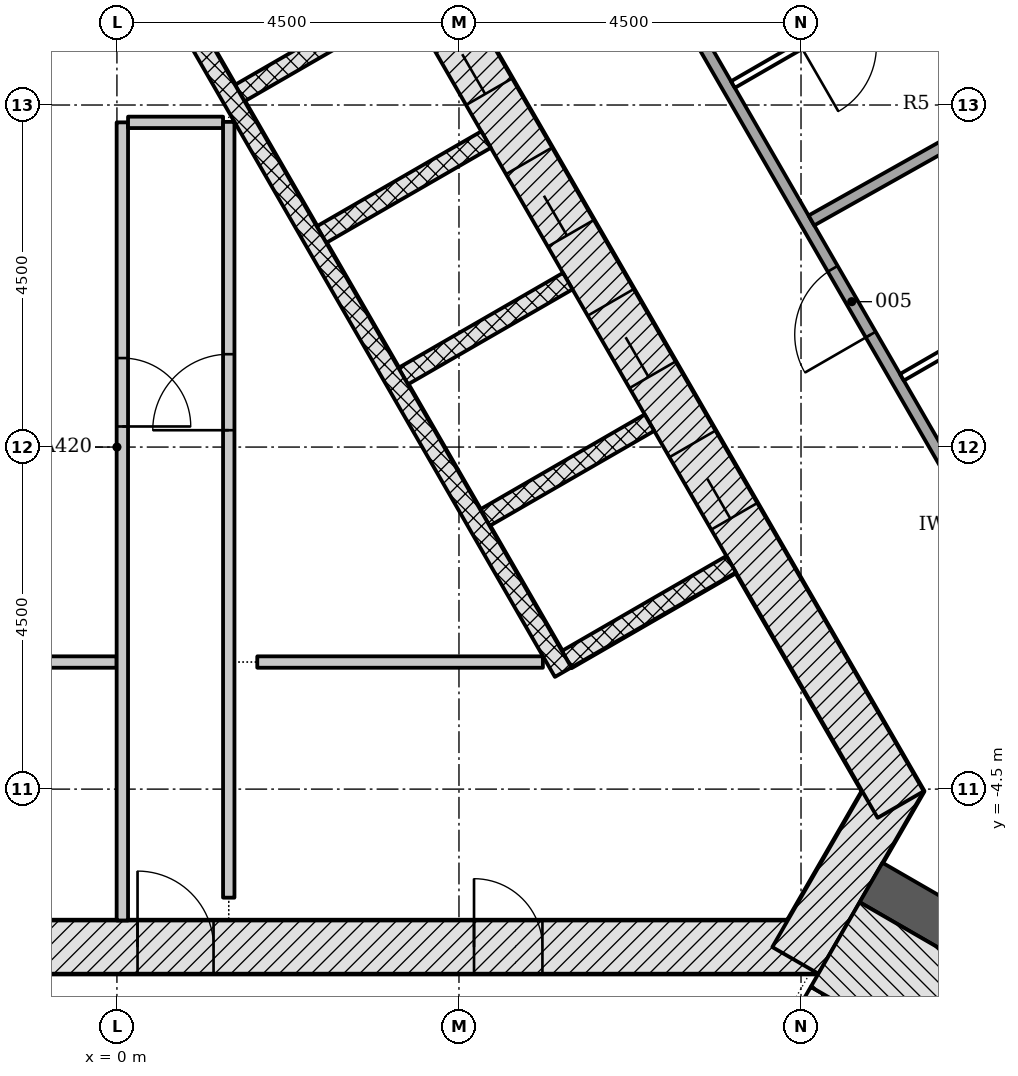
"""IFC4 building model, lengths in metres.
Left out: names, types, materials, properties, quantities, classifications, styles, units other than length and angle.
Written with IfcOpenShell. Run it as: python <this file> out.ifc"""

import sys

from ifc_helpers import new_model, si_unit, direction, frame, frame_2d, origin, place, context, subcontext, project, spatial, rectangle, extrude, element, fill, save


model = new_model("IFC4")
c1 = context("Model", 3, precision=1e-05, world=origin(), true_north=direction((0.0, 1.0)))
c2 = subcontext(c1, "Body", "Model", "MODEL_VIEW")
j1 = project(units=[si_unit("LENGTHUNIT", "METRE"), si_unit("PLANEANGLEUNIT", "RADIAN")], contexts=[c1])
p1 = place(None, origin())
s1 = spatial("IfcSite", under=j1, at=p1, CompositionType="ELEMENT")
p2 = place(p1, origin())
s2 = spatial("IfcBuilding", under=s1, at=p2, CompositionType="ELEMENT")
p3 = place(p2, frame((0.0, 0.0, 240.0)))
s3 = spatial("IfcBuildingStorey", under=s2, at=p3, CompositionType="ELEMENT", Elevation=240.0)
p4 = place(p3, frame((-9.229, -6.578, -0.2), z_axis=(0.0, 0.0, 1.0), x_axis=(1.0, 0.0, 0.0)))
e1 = element("IfcWall", 1, at=p4, inside=s3, PredefinedType="SHEAR", context=c2, shape_type="SweptSolid", body=[
    extrude(rectangle(XDim=18.458, YDim=0.7, at=frame_2d((9.229, 0.0))), origin(), (0.0, 0.0, 1.0), 3.6),
])
p5 = place(p4, frame((9.5, 0.0, 0.2)))
e2 = element("IfcOpeningElement", 2, at=p5, cuts=e1, PredefinedType="OPENING", context=c2, shape_type="SweptSolid", body=[
    extrude(rectangle(XDim=1.0, YDim=2.1, at=frame_2d((0.5, 1.05))), frame((0.0, 0.36, 0.0), z_axis=(0.0, -1.0, 0.0), x_axis=(1.0, 0.0, 0.0)), (0.0, 0.0, 1.0), 0.72),
])
p6 = place(p4, frame((4.402, 0.0, 0.2)))
e3 = element("IfcOpeningElement", 3, at=p6, cuts=e1, PredefinedType="OPENING", context=c2, shape_type="SweptSolid", body=[
    extrude(rectangle(XDim=0.9, YDim=2.1, at=frame_2d((0.45, 1.05))), frame((0.0, 0.36, 0.0), z_axis=(0.0, -1.0, 0.0), x_axis=(1.0, 0.0, 0.0)), (0.0, 0.0, 1.0), 0.72),
])
p7 = place(p4, frame((13.927, 0.0, 0.2)))
e4 = element("IfcOpeningElement", 4, at=p7, cuts=e1, PredefinedType="OPENING", context=c2, shape_type="SweptSolid", body=[
    extrude(rectangle(XDim=0.9, YDim=2.1, at=frame_2d((0.45, 1.05))), frame((0.0, 0.36, 0.0), z_axis=(0.0, -1.0, 0.0), x_axis=(1.0, 0.0, 0.0)), (0.0, 0.0, 1.0), 0.72),
])
p8 = place(p3, frame((8.926, -6.753, -0.2), z_axis=(0.0, 0.0, 1.0), x_axis=(0.500042739161, 0.866000726912, 0.0)))
e5 = element("IfcWall", 5, at=p8, inside=s3, PredefinedType="SHEAR", context=c2, shape_type="SweptSolid", body=[
    extrude(rectangle(XDim=2.771, YDim=0.7, at=frame_2d((1.386, 0.0))), origin(), (0.0, 0.0, 1.0), 3.6),
])
p9 = place(p3, frame((10.311, -4.703, -0.2), z_axis=(0.0, 0.0, 1.0), x_axis=(-0.500001446645, 0.866024568562, 0.0)))
e6 = element("IfcWall", 6, at=p9, inside=s3, PredefinedType="SHEAR", context=c2, shape_type="SweptSolid", body=[
    extrude(rectangle(XDim=18.458, YDim=0.7, at=frame_2d((9.229, 0.0))), origin(), (0.0, 0.0, 1.0), 3.6),
])
p10 = place(p9, frame((4.379, 0.0, 0.2)))
e7 = element("IfcOpeningElement", 7, at=p10, cuts=e6, PredefinedType="OPENING", context=c2, shape_type="SweptSolid", body=[
    extrude(rectangle(XDim=1.1, YDim=2.1, at=frame_2d((0.55, 1.05))), frame((0.0, 0.36, 0.0), z_axis=(0.0, -1.0, 0.0), x_axis=(1.0, 0.0, 0.0)), (0.0, 0.0, 1.0), 0.72),
])
p11 = place(p9, frame((6.529, 0.0, 0.2)))
e8 = element("IfcOpeningElement", 8, at=p11, cuts=e6, PredefinedType="OPENING", context=c2, shape_type="SweptSolid", body=[
    extrude(rectangle(XDim=1.1, YDim=2.1, at=frame_2d((0.55, 1.05))), frame((0.0, 0.36, 0.0), z_axis=(0.0, -1.0, 0.0), x_axis=(1.0, 0.0, 0.0)), (0.0, 0.0, 1.0), 0.72),
])
p12 = place(p9, frame((8.679, 0.0, 0.2)))
e9 = element("IfcOpeningElement", 9, at=p12, cuts=e6, PredefinedType="OPENING", context=c2, shape_type="SweptSolid", body=[
    extrude(rectangle(XDim=1.1, YDim=2.1, at=frame_2d((0.55, 1.05))), frame((0.0, 0.36, 0.0), z_axis=(0.0, -1.0, 0.0), x_axis=(1.0, 0.0, 0.0)), (0.0, 0.0, 1.0), 0.72),
])
p13 = place(p9, frame((10.829, 0.0, 0.2)))
e10 = element("IfcOpeningElement", 10, at=p13, cuts=e6, PredefinedType="OPENING", context=c2, shape_type="SweptSolid", body=[
    extrude(rectangle(XDim=1.1, YDim=2.1, at=frame_2d((0.55, 1.05))), frame((0.0, 0.36, 0.0), z_axis=(0.0, -1.0, 0.0), x_axis=(1.0, 0.0, 0.0)), (0.0, 0.0, 1.0), 0.72),
])
p14 = place(p9, frame((12.979, 0.0, 0.2)))
e11 = element("IfcOpeningElement", 11, at=p14, cuts=e6, PredefinedType="OPENING", context=c2, shape_type="SweptSolid", body=[
    extrude(rectangle(XDim=1.1, YDim=2.1, at=frame_2d((0.55, 1.05))), frame((0.0, 0.36, 0.0), z_axis=(0.0, -1.0, 0.0), x_axis=(1.0, 0.0, 0.0)), (0.0, 0.0, 1.0), 0.72),
])
p15 = place(p3, frame((-1.083, 11.281, -0.2), z_axis=(0.0, 0.0, 1.0), x_axis=(-0.500001446645, -0.866024568562, 0.0)))
e12 = element("IfcWall", 12, at=p15, inside=s3, PredefinedType="SHEAR", context=c2, shape_type="SweptSolid", body=[
    extrude(rectangle(XDim=18.458, YDim=0.7, at=frame_2d((9.229, 0.0))), origin(), (0.0, 0.0, 1.0), 3.6),
])
p16 = place(p15, frame((8.979, 0.0, 0.2)))
e13 = element("IfcOpeningElement", 13, at=p16, cuts=e12, PredefinedType="OPENING", context=c2, shape_type="SweptSolid", body=[
    extrude(rectangle(XDim=1.2, YDim=2.1, at=frame_2d((0.6, 1.05))), frame((0.0, 0.36, 0.0), z_axis=(0.0, -1.0, 0.0), x_axis=(1.0, 0.0, 0.0)), (0.0, 0.0, 1.0), 0.72),
])
p17 = place(p15, frame((11.029, 0.0, 0.2)))
e14 = element("IfcOpeningElement", 14, at=p17, cuts=e12, PredefinedType="OPENING", context=c2, shape_type="SweptSolid", body=[
    extrude(rectangle(XDim=1.2, YDim=2.1, at=frame_2d((0.6, 1.05))), frame((0.0, 0.36, 0.0), z_axis=(0.0, -1.0, 0.0), x_axis=(1.0, 0.0, 0.0)), (0.0, 0.0, 1.0), 0.72),
])
p18 = place(p3, frame((9.922, -5.728, -0.2), z_axis=(0.0, 0.0, 1.0), x_axis=(0.866029688112, -0.499992579254, 0.0)))
e15 = element("IfcWall", 15, at=p18, inside=s3, PredefinedType="SHEAR", context=c2, shape_type="SweptSolid", body=[
    extrude(rectangle(XDim=7.093, YDim=0.6, at=frame_2d((3.547, 0.0))), origin(), (0.0, 0.0, 1.0), 3.6),
])
for number, where, z_axis, x_axis in (
    (16, (8.081, -1.541, -0.2), (0.0, 0.0, 1.0), (-0.866, -0.5, 0.0)),
    (17, (7.006, 0.321, -0.2), (0.0, 0.0, 1.0), (-0.866, -0.5, 0.0)),
):
    element("IfcWall", number, at=place(p3, frame(where, z_axis=z_axis, x_axis=x_axis)), inside=s3, PredefinedType="PARTITIONING", context=c2, shape_type="SweptSolid", body=[
        extrude(rectangle(XDim=2.5, YDim=0.25, at=frame_2d((1.25, 0.0))), origin(), (0.0, 0.0, 1.0), 3.6),
    ])
p19 = place(p3, frame((5.931, 2.183, -0.2), z_axis=(0.0, 0.0, 1.0), x_axis=(-0.866047370643, -0.499961950354, 0.0)))
e18 = element("IfcWall", 18, at=p19, inside=s3, PredefinedType="PARTITIONING", context=c2, shape_type="SweptSolid", body=[
    extrude(rectangle(XDim=2.5, YDim=0.25, at=frame_2d((1.25, 0.0))), origin(), (0.0, 0.0, 1.0), 3.6),
])
for number, where, z_axis, x_axis in (
    (19, (4.856, 4.045, -0.2), (0.0, 0.0, 1.0), (-0.866, -0.5, 0.0)),
    (20, (3.781, 5.907, -0.2), (0.0, 0.0, 1.0), (-0.866, -0.5, 0.0)),
):
    element("IfcWall", number, at=place(p3, frame(where, z_axis=z_axis, x_axis=x_axis)), inside=s3, PredefinedType="PARTITIONING", context=c2, shape_type="SweptSolid", body=[
        extrude(rectangle(XDim=2.5, YDim=0.25, at=frame_2d((1.25, 0.0))), origin(), (0.0, 0.0, 1.0), 3.6),
    ])
p20 = place(p3, frame((5.87, -2.961, 0.0), z_axis=(0.0, 0.0, 1.0), x_axis=(-0.50000615651, 0.866021849293, 0.0)))
e21 = element("IfcWall", 21, at=p20, inside=s3, PredefinedType="PARTITIONING", context=c2, shape_type="SweptSolid", body=[
    extrude(rectangle(XDim=11.0, YDim=0.25, at=frame_2d((5.5, 0.0))), origin(), (0.0, 0.0, 1.0), 3.4),
])
p21 = place(p3, frame((-5.142, -2.828, 0.0), z_axis=(0.0, 0.0, 1.0), x_axis=(1.0, 0.0, 0.0)))
e22 = element("IfcWall", 22, at=p21, inside=s3, PredefinedType="PARTITIONING", context=c2, shape_type="SweptSolid", body=[
    extrude(rectangle(XDim=5.139, YDim=0.15, at=frame_2d((2.569, 0.0))), origin(), (0.0, 0.0, 1.0), 3.4),
])
p22 = place(p3, frame((0.071, 4.272, 0.0), z_axis=(0.0, 0.0, 1.0), x_axis=(0.0, -1.0, 0.0)))
e23 = element("IfcWall", 23, at=p22, inside=s3, PredefinedType="PARTITIONING", context=c2, shape_type="SweptSolid", body=[
    extrude(rectangle(XDim=10.5, YDim=0.15, at=frame_2d((5.25, 0.0))), origin(), (0.0, 0.0, 1.0), 3.4),
])
p23 = place(p22, frame((3.101, 0.0, 0.0)))
e24 = element("IfcOpeningElement", 24, at=p23, cuts=e23, PredefinedType="OPENING", context=c2, shape_type="SweptSolid", body=[
    extrude(rectangle(XDim=0.9, YDim=2.1, at=frame_2d((0.45, 1.05))), frame((0.0, 0.085, 0.0), z_axis=(0.0, -1.0, 0.0), x_axis=(1.0, 0.0, 0.0)), (0.0, 0.0, 1.0), 0.17),
])
p24 = place(p3, frame((0.146, 4.272, 0.0), z_axis=(0.0, 0.0, 1.0), x_axis=(1.0, 0.0, 0.0)))
e25 = element("IfcWall", 25, at=p24, inside=s3, PredefinedType="PARTITIONING", context=c2, shape_type="SweptSolid", body=[
    extrude(rectangle(XDim=1.25, YDim=0.15, at=frame_2d((0.625, 0.0))), origin(), (0.0, 0.0, 1.0), 3.4),
])
p25 = place(p3, frame((1.471, -5.928, 0.0), z_axis=(0.0, 0.0, 1.0), x_axis=(0.0, 1.0, 0.0)))
e26 = element("IfcWall", 26, at=p25, inside=s3, PredefinedType="PARTITIONING", context=c2, shape_type="SweptSolid", body=[
    extrude(rectangle(XDim=10.206, YDim=0.15, at=frame_2d((5.103, 0.0))), origin(), (0.0, 0.0, 1.0), 3.4),
])
p26 = place(p25, frame((6.15, 0.0, 0.0)))
e27 = element("IfcOpeningElement", 27, at=p26, cuts=e26, PredefinedType="OPENING", context=c2, shape_type="SweptSolid", body=[
    extrude(rectangle(XDim=1.0, YDim=2.1, at=frame_2d((0.5, 1.05))), frame((0.0, 0.085, 0.0), z_axis=(0.0, -1.0, 0.0), x_axis=(1.0, 0.0, 0.0)), (0.0, 0.0, 1.0), 0.17),
])
p27 = place(p3, frame((1.846, -2.828, 0.0), z_axis=(0.0, 0.0, 1.0), x_axis=(1.0, 0.0, 0.0)))
e28 = element("IfcWall", 28, at=p27, inside=s3, PredefinedType="PARTITIONING", context=c2, shape_type="SweptSolid", body=[
    extrude(rectangle(XDim=3.758, YDim=0.15, at=frame_2d((1.879, 0.0))), origin(), (0.0, 0.0, 1.0), 3.4),
])
p28 = place(p3, frame((7.44, -10.226, -0.2), z_axis=(0.0, 0.0, 1.0), x_axis=(0.500022077904, 0.866012656725, 0.0)))
e29 = element("IfcWall", 29, at=p28, inside=s3, PredefinedType="SHEAR", context=c2, shape_type="SweptSolid", body=[
    extrude(rectangle(XDim=3.55, YDim=0.2, at=frame_2d((1.775, 0.0))), origin(), (0.0, 0.0, 1.0), 3.6),
])
p29 = place(p28, frame((1.175, 0.0, 0.2)))
e30 = element("IfcOpeningElement", 30, at=p29, cuts=e29, PredefinedType="OPENING", context=c2, shape_type="SweptSolid", body=[
    extrude(rectangle(XDim=1.2, YDim=2.1, at=frame_2d((0.6, 1.05))), frame((0.0, 0.11, 0.0), z_axis=(0.0, -1.0, 0.0), x_axis=(1.0, 0.0, 0.0)), (0.0, 0.0, 1.0), 0.22),
])
p30 = place(p3, frame((9.45, -6.545, -0.2), z_axis=(0.0, 0.0, 1.0), x_axis=(0.866023389271, -0.500003489223, 0.0)))
e31 = element("IfcWall", 31, at=p30, inside=s3, PredefinedType="SHEAR", context=c2, shape_type="SweptSolid", body=[
    extrude(rectangle(XDim=7.094, YDim=1.286, at=frame_2d((3.547, 0.0))), origin(), (0.0, 0.0, 1.0), 3.6),
])
p31 = place(p3, frame((15.836, -8.772, 0.0), z_axis=(0.0, 0.0, 1.0), x_axis=(-0.500001479768, 0.866024549438, 0.0)))
e32 = element("IfcWall", 32, at=p31, inside=s3, PredefinedType="PARTITIONING", context=c2, shape_type="SweptSolid", body=[
    extrude(rectangle(XDim=17.9, YDim=0.15, at=frame_2d((8.95, 0.0))), origin(), (0.0, 0.0, 1.0), 2.852),
])
p32 = place(p31, frame((2.973, 0.0, 0.0)))
e33 = element("IfcOpeningElement", 33, at=p32, cuts=e32, PredefinedType="OPENING", context=c2, shape_type="SweptSolid", body=[
    extrude(rectangle(XDim=1.0, YDim=2.1, at=frame_2d((0.5, 1.05))), frame((0.0, 0.085, 0.0), z_axis=(0.0, -1.0, 0.0), x_axis=(1.0, 0.0, 0.0)), (0.0, 0.0, 1.0), 0.17),
])
p33 = place(p31, frame((11.837, 0.0, 0.0)))
e34 = element("IfcOpeningElement", 34, at=p33, cuts=e32, PredefinedType="OPENING", context=c2, shape_type="SweptSolid", body=[
    extrude(rectangle(XDim=1.0, YDim=2.1, at=frame_2d((0.5, 1.05))), frame((0.0, 0.085, 0.0), z_axis=(0.0, -1.0, 0.0), x_axis=(1.0, 0.0, 0.0)), (0.0, 0.0, 1.0), 0.17),
])
p34 = place(p3, frame((12.991, 2.456, 0.0), z_axis=(0.0, 0.0, 1.0), x_axis=(-0.866030883713, -0.499990508365, 0.0)))
e35 = element("IfcWall", 35, at=p34, inside=s3, PredefinedType="PARTITIONING", context=c2, shape_type="SweptSolid", body=[
    extrude(rectangle(XDim=3.075, YDim=0.1, at=frame_2d((1.537, 0.0))), origin(), (0.0, 0.0, 1.0), 3.4),
])
p35 = place(p34, frame((1.05, 0.0, 0.0)))
e36 = element("IfcOpeningElement", 36, at=p35, cuts=e35, PredefinedType="OPENING", context=c2, shape_type="SweptSolid", body=[
    extrude(rectangle(XDim=1.0, YDim=2.1, at=frame_2d((0.5, 1.05))), frame((0.0, 0.06, 0.0), z_axis=(0.0, -1.0, 0.0), x_axis=(1.0, 0.0, 0.0)), (0.0, 0.0, 1.0), 0.12),
])
p36 = place(p3, frame((13.362, 5.357, 0.0), z_axis=(0.0, 0.0, 1.0), x_axis=(-0.871708672205, -0.490024479799, 0.0)))
e37 = element("IfcWall", 37, at=p36, inside=s3, PredefinedType="PARTITIONING", context=c2, shape_type="SweptSolid", body=[
    extrude(rectangle(XDim=4.847, YDim=0.15, at=frame_2d((2.424, 0.0))), origin(), (0.0, 0.0, 1.0), 3.4),
])
p37 = place(p3, frame((11.823, 4.578, 0.0), z_axis=(0.0, 0.0, 1.0), x_axis=(-0.499990325971, 0.866030989016, 0.0)))
e38 = element("IfcWall", 38, at=p37, inside=s3, PredefinedType="PARTITIONING", context=c2, shape_type="SweptSolid", body=[
    extrude(rectangle(XDim=2.025, YDim=0.1, at=frame_2d((1.012, 0.0))), origin(), (0.0, 0.0, 1.0), 3.4),
])
p38 = place(p3, frame((10.768, 6.306, 0.0), z_axis=(0.0, 0.0, 1.0), x_axis=(-0.866050731258, -0.499956128963, 0.0)))
e39 = element("IfcWall", 39, at=p38, inside=s3, PredefinedType="PARTITIONING", context=c2, shape_type="SweptSolid", body=[
    extrude(rectangle(XDim=3.075, YDim=0.1, at=frame_2d((1.538, 0.0))), origin(), (0.0, 0.0, 1.0), 3.4),
])
p39 = place(p38, frame((1.05, 0.0, 0.0)))
e40 = element("IfcOpeningElement", 40, at=p39, cuts=e39, PredefinedType="OPENING", context=c2, shape_type="SweptSolid", body=[
    extrude(rectangle(XDim=1.0, YDim=2.1, at=frame_2d((0.5, 1.05))), frame((0.0, 0.06, 0.0), z_axis=(0.0, -1.0, 0.0), x_axis=(1.0, 0.0, 0.0)), (0.0, 0.0, 1.0), 0.12),
])
p40 = place(p3, frame((-0.783, 18.1, 0.0), z_axis=(0.0, 0.0, 1.0), x_axis=(-0.499991500055, -0.866030311174, 0.0)))
e41 = element("IfcWall", 41, at=p40, inside=s3, PredefinedType="PARTITIONING", context=c2, shape_type="SweptSolid", body=[
    extrude(rectangle(XDim=17.674, YDim=0.15, at=frame_2d((8.837, 0.0))), origin(), (0.0, 0.0, 1.0), 2.852),
])
p41 = place(p10, origin())
e42 = element("IfcDoor", 42, at=p41, inside=s3, OperationType="DOUBLE_DOOR_SLIDING", PredefinedType="DOOR", context=c2, shape_type="SweptSolid", body=[
    extrude(rectangle(XDim=1.1, YDim=2.1, at=frame_2d((0.55, 1.05))), frame((0.0, 0.025, 0.0), z_axis=(0.0, -1.0, 0.0), x_axis=(1.0, 0.0, 0.0)), (0.0, 0.0, 1.0), 0.05),
])
fill(e7, e42)
p42 = place(p11, origin())
e43 = element("IfcDoor", 43, at=p42, inside=s3, OperationType="DOUBLE_DOOR_SLIDING", PredefinedType="DOOR", context=c2, shape_type="SweptSolid", body=[
    extrude(rectangle(XDim=1.1, YDim=2.1, at=frame_2d((0.55, 1.05))), frame((0.0, 0.025, 0.0), z_axis=(0.0, -1.0, 0.0), x_axis=(1.0, 0.0, 0.0)), (0.0, 0.0, 1.0), 0.05),
])
fill(e8, e43)
p43 = place(p12, origin())
e44 = element("IfcDoor", 44, at=p43, inside=s3, OperationType="DOUBLE_DOOR_SLIDING", PredefinedType="DOOR", context=c2, shape_type="SweptSolid", body=[
    extrude(rectangle(XDim=1.1, YDim=2.1, at=frame_2d((0.55, 1.05))), frame((0.0, 0.025, 0.0), z_axis=(0.0, -1.0, 0.0), x_axis=(1.0, 0.0, 0.0)), (0.0, 0.0, 1.0), 0.05),
])
fill(e9, e44)
p44 = place(p13, origin())
e45 = element("IfcDoor", 45, at=p44, inside=s3, OperationType="DOUBLE_DOOR_SLIDING", PredefinedType="DOOR", context=c2, shape_type="SweptSolid", body=[
    extrude(rectangle(XDim=1.1, YDim=2.1, at=frame_2d((0.55, 1.05))), frame((0.0, 0.025, 0.0), z_axis=(0.0, -1.0, 0.0), x_axis=(1.0, 0.0, 0.0)), (0.0, 0.0, 1.0), 0.05),
])
fill(e10, e45)
p45 = place(p5, origin())
e46 = element("IfcDoor", 46, at=p45, inside=s3, OperationType="SINGLE_SWING_LEFT", PredefinedType="DOOR", context=c2, shape_type="SweptSolid", body=[
    extrude(rectangle(XDim=1.0, YDim=2.1, at=frame_2d((0.5, 1.05))), frame((0.0, 0.075, 0.0), z_axis=(0.0, -1.0, 0.0), x_axis=(1.0, 0.0, 0.0)), (0.0, 0.0, 1.0), 0.15),
])
fill(e2, e46)
p46 = place(p7, origin())
e47 = element("IfcDoor", 47, at=p46, inside=s3, OperationType="SINGLE_SWING_LEFT", PredefinedType="DOOR", context=c2, shape_type="SweptSolid", body=[
    extrude(rectangle(XDim=0.9, YDim=2.1, at=frame_2d((0.45, 1.05))), frame((0.0, 0.075, 0.0), z_axis=(0.0, -1.0, 0.0), x_axis=(1.0, 0.0, 0.0)), (0.0, 0.0, 1.0), 0.15),
])
fill(e4, e47)
p47 = place(p23, origin())
e48 = element("IfcDoor", 48, at=p47, inside=s3, OperationType="SINGLE_SWING_RIGHT", PredefinedType="DOOR", context=c2, shape_type="SweptSolid", body=[
    extrude(rectangle(XDim=0.9, YDim=2.1, at=frame_2d((0.45, 1.05))), frame((0.0, 0.025, 0.0), z_axis=(0.0, -1.0, 0.0), x_axis=(1.0, 0.0, 0.0)), (0.0, 0.0, 1.0), 0.05),
])
fill(e24, e48)
p48 = place(p26, origin())
e49 = element("IfcDoor", 49, at=p48, inside=s3, OperationType="SINGLE_SWING_LEFT", PredefinedType="DOOR", context=c2, shape_type="SweptSolid", body=[
    extrude(rectangle(XDim=1.0, YDim=2.1, at=frame_2d((0.5, 1.05))), frame((0.0, 0.025, 0.0), z_axis=(0.0, -1.0, 0.0), x_axis=(1.0, 0.0, 0.0)), (0.0, 0.0, 1.0), 0.05),
])
fill(e27, e49)
p49 = place(p33, origin())
e50 = element("IfcDoor", 50, at=p49, inside=s3, OperationType="SINGLE_SWING_LEFT", PredefinedType="DOOR", context=c2, shape_type="SweptSolid", body=[
    extrude(rectangle(XDim=1.0, YDim=2.1, at=frame_2d((0.5, 1.05))), frame((0.0, 0.025, 0.0), z_axis=(0.0, -1.0, 0.0), x_axis=(1.0, 0.0, 0.0)), (0.0, 0.0, 1.0), 0.05),
])
fill(e34, e50)
save(model, sys.argv[1])
